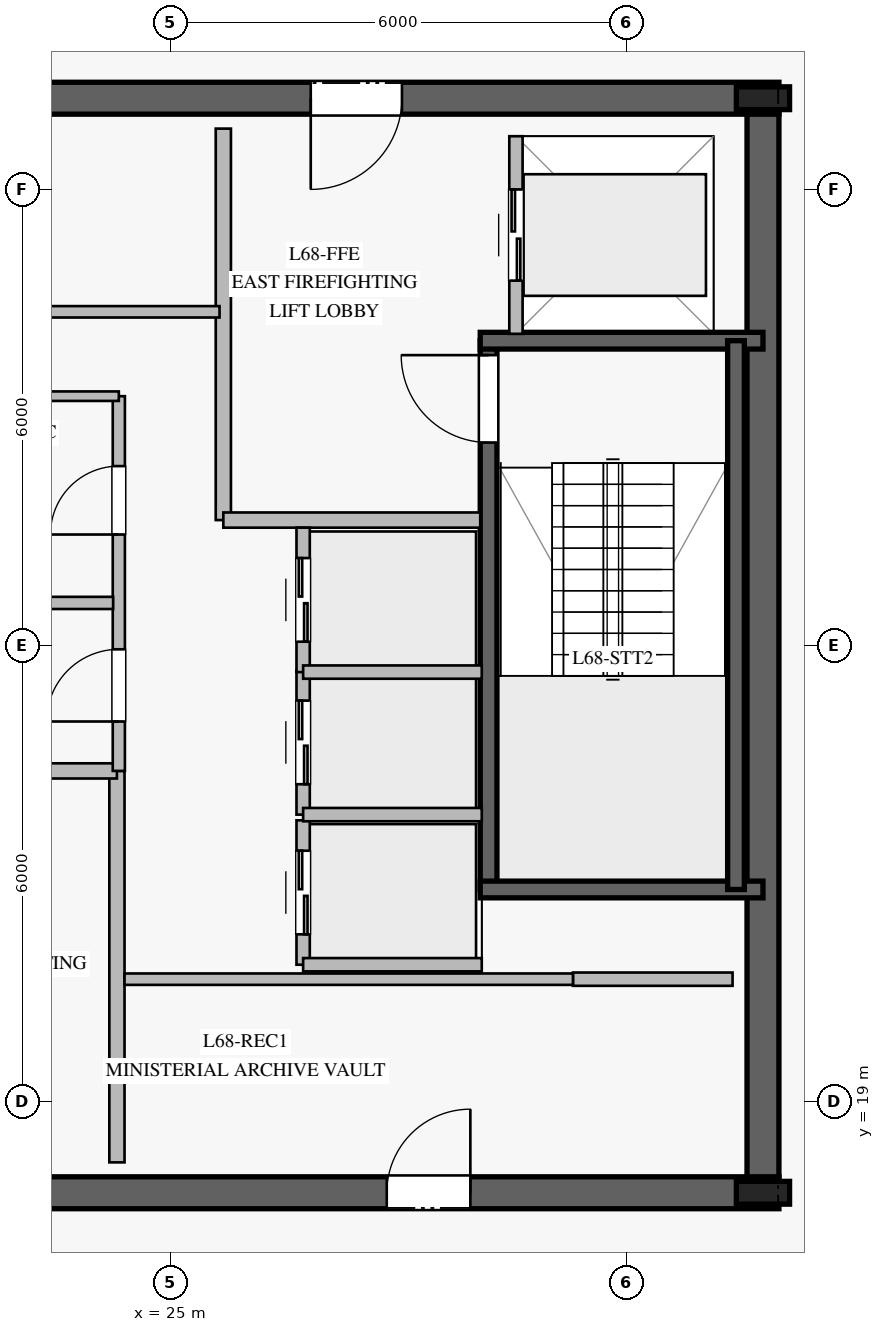
"""IFC4 building model, lengths in metres.
Left out: names, types, materials, properties, quantities, classifications, styles, units other than length and angle.
Written with IfcOpenShell. Run it as: python <this file> out.ifc"""

import sys

from ifc_helpers import new_model, si_unit, direction, frame, frame_2d, origin, origin_2d, place, context, subcontext, project, spatial, rectangle, i_section, extrude, element, fill, save


model = new_model("IFC4")
c1 = context("Model", 3, precision=1e-05, world=origin(), true_north=direction((0.0, 1.0)))
c2 = subcontext(c1, "Body", "Model", "MODEL_VIEW")
j1 = project(units=[si_unit("LENGTHUNIT", "METRE"), si_unit("PLANEANGLEUNIT", "RADIAN")], contexts=[c1])
p1 = place(None, origin())
s1 = spatial("IfcSite", under=j1, at=p1, CompositionType="ELEMENT")
p2 = place(p1, origin())
s2 = spatial("IfcBuilding", under=s1, at=p2, CompositionType="ELEMENT")
p3 = place(p2, frame((0.0, 0.0, 282.2)))
s3 = spatial("IfcBuildingStorey", under=s2, at=p3, CompositionType="ELEMENT", Elevation=282.2)
p4 = place(p3, frame((16.99, 17.8, 0.0), z_axis=(0.0, 0.0, 1.0), x_axis=(1.0, 0.0, 0.0)))
e1 = element("IfcWall", 1, at=p4, inside=s3, PredefinedType="SHEAR", context=c2, shape_type="SweptSolid", body=[
    extrude(rectangle(XDim=16.02, YDim=0.42, at=frame_2d((8.01, 0.0))), origin(), (0.0, 0.0, 1.0), 3.78),
])
p5 = place(p4, frame((4.96, 0.0, 0.0)))
e2 = element("IfcOpeningElement", 2, at=p5, cuts=e1, PredefinedType="OPENING", context=c2, shape_type="SweptSolid", body=[
    extrude(rectangle(XDim=1.2, YDim=2.25, at=frame_2d((0.6, 1.125))), frame((0.0, 0.22, 0.0), z_axis=(0.0, -1.0, 0.0), x_axis=(1.0, 0.0, 0.0)), (0.0, 0.0, 1.0), 0.44),
])
p6 = place(p4, frame((10.86, 0.0, 0.0)))
e3 = element("IfcOpeningElement", 3, at=p6, cuts=e1, PredefinedType="OPENING", context=c2, shape_type="SweptSolid", body=[
    extrude(rectangle(XDim=1.1, YDim=2.2, at=frame_2d((0.55, 1.1))), frame((0.0, 0.22, 0.0), z_axis=(0.0, -1.0, 0.0), x_axis=(1.0, 0.0, 0.0)), (0.0, 0.0, 1.0), 0.44),
])
p7 = place(p3, frame((33.01, 32.2, 0.0), z_axis=(0.0, 0.0, 1.0), x_axis=(-1.0, 0.0, 0.0)))
e4 = element("IfcWall", 4, at=p7, inside=s3, PredefinedType="SHEAR", context=c2, shape_type="SweptSolid", body=[
    extrude(rectangle(XDim=16.02, YDim=0.42, at=frame_2d((8.01, 0.0))), origin(), (0.0, 0.0, 1.0), 3.78),
])
p8 = place(p7, frame((4.96, 0.0, 0.0)))
e5 = element("IfcOpeningElement", 5, at=p8, cuts=e4, PredefinedType="OPENING", context=c2, shape_type="SweptSolid", body=[
    extrude(rectangle(XDim=1.2, YDim=2.25, at=frame_2d((0.6, 1.125))), frame((0.0, 0.22, 0.0), z_axis=(0.0, -1.0, 0.0), x_axis=(1.0, 0.0, 0.0)), (0.0, 0.0, 1.0), 0.44),
])
p9 = place(p7, frame((9.785, 0.0, 0.0)))
e6 = element("IfcOpeningElement", 6, at=p9, cuts=e4, PredefinedType="OPENING", context=c2, shape_type="SweptSolid", body=[
    extrude(rectangle(XDim=1.1, YDim=2.2, at=frame_2d((0.55, 1.1))), frame((0.0, 0.22, 0.0), z_axis=(0.0, -1.0, 0.0), x_axis=(1.0, 0.0, 0.0)), (0.0, 0.0, 1.0), 0.44),
])
p10 = place(p3, frame((32.8, 18.01, 0.0), z_axis=(0.0, 0.0, 1.0), x_axis=(0.0, 1.0, 0.0)))
e7 = element("IfcWall", 7, at=p10, inside=s3, PredefinedType="SHEAR", context=c2, shape_type="SweptSolid", body=[
    extrude(rectangle(XDim=13.98, YDim=0.42, at=frame_2d((6.99, 0.0))), origin(), (0.0, 0.0, 1.0), 3.78),
])
for number, where, z_axis, x_axis in (
    (8, (32.8, 17.8, 0.0), (0.0, 0.0, 1.0), (1.0, 0.0, 0.0)),
    (9, (32.8, 32.2, 0.0), (0.0, 0.0, 1.0), (1.0, 0.0, 0.0)),
):
    element("IfcColumn", number, at=place(p3, frame(where, z_axis=z_axis, x_axis=x_axis)), inside=s3, PredefinedType="COLUMN", context=c2, shape_type="SweptSolid", body=[
        extrude(i_section(OverallWidth=0.3, OverallDepth=0.7, WebThickness=0.017, FlangeThickness=0.032, at=origin_2d()), origin(), (0.0, 0.0, 1.0), 4.0),
    ])
p11 = place(p3, frame((29.19, 21.79, 0.0), z_axis=(0.0, 0.0, 1.0), x_axis=(0.0, 1.0, 0.0)))
e10 = element("IfcWall", 10, at=p11, inside=s3, PredefinedType="SOLIDWALL", context=c2, shape_type="SweptSolid", body=[
    extrude(rectangle(XDim=7.22, YDim=0.22, at=frame_2d((3.61, 0.0))), origin(), (0.0, 0.0, 1.0), 3.78),
])
p12 = place(p11, frame((5.88, 0.0, 0.0)))
e11 = element("IfcOpeningElement", 11, at=p12, cuts=e10, PredefinedType="OPENING", context=c2, shape_type="SweptSolid", body=[
    extrude(rectangle(XDim=1.15, YDim=2.2, at=frame_2d((0.575, 1.1))), frame((0.0, 0.12, 0.0), z_axis=(0.0, -1.0, 0.0), x_axis=(1.0, 0.0, 0.0)), (0.0, 0.0, 1.0), 0.24),
])
for number, where, z_axis, x_axis in (
    (12, (29.08, 21.79, 0.0), (0.0, 0.0, 1.0), (1.0, 0.0, 0.0)),
    (13, (29.08, 29.01, 0.0), (0.0, 0.0, 1.0), (1.0, 0.0, 0.0)),
):
    element("IfcWall", number, at=place(p3, frame(where, z_axis=z_axis, x_axis=x_axis)), inside=s3, PredefinedType="SOLIDWALL", context=c2, shape_type="SweptSolid", body=[
        extrude(rectangle(XDim=3.72, YDim=0.22, at=frame_2d((1.86, 0.0))), origin(), (0.0, 0.0, 1.0), 3.78),
    ])
p13 = place(p3, frame((32.445, 29.01, 0.0), z_axis=(0.0, 0.0, 1.0), x_axis=(0.0, -1.0, 0.0)))
e14 = element("IfcWall", 14, at=p13, inside=s3, PredefinedType="SOLIDWALL", context=c2, shape_type="SweptSolid", body=[
    extrude(rectangle(XDim=7.22, YDim=0.22, at=frame_2d((3.61, 0.0))), origin(), (0.0, 0.0, 1.0), 3.78),
])
p14 = place(p3, frame((24.3, 18.2, 0.0), z_axis=(0.0, 0.0, 1.0), x_axis=(0.0, 1.0, 0.0)))
e15 = element("IfcWall", 15, at=p14, inside=s3, PredefinedType="PARTITIONING", context=c2, shape_type="SweptSolid", body=[
    extrude(rectangle(XDim=5.15, YDim=0.2, at=frame_2d((2.575, 0.0))), origin(), (0.0, 0.0, 1.0), 3.78),
])
p15 = place(p3, frame((20.92, 23.35, 0.0), z_axis=(0.0, 0.0, 1.0), x_axis=(1.0, 0.0, 0.0)))
e16 = element("IfcWall", 16, at=p15, inside=s3, PredefinedType="PARTITIONING", context=c2, shape_type="SweptSolid", body=[
    extrude(rectangle(XDim=3.38, YDim=0.2, at=frame_2d((1.69, 0.0))), origin(), (0.0, 0.0, 1.0), 3.78),
])
p16 = place(p3, frame((25.7, 26.65, 0.0), z_axis=(0.0, 0.0, 1.0), x_axis=(0.0, 1.0, 0.0)))
e17 = element("IfcWall", 17, at=p16, inside=s3, PredefinedType="PARTITIONING", context=c2, shape_type="SweptSolid", body=[
    extrude(rectangle(XDim=5.15, YDim=0.2, at=frame_2d((2.575, 0.0))), origin(), (0.0, 0.0, 1.0), 3.78),
])
p17 = place(p3, frame((25.7, 26.65, 0.0), z_axis=(0.0, 0.0, 1.0), x_axis=(1.0, 0.0, 0.0)))
e18 = element("IfcWall", 18, at=p17, inside=s3, PredefinedType="PARTITIONING", context=c2, shape_type="SweptSolid", body=[
    extrude(rectangle(XDim=3.38, YDim=0.2, at=frame_2d((1.69, 0.0))), origin(), (0.0, 0.0, 1.0), 3.78),
])
p18 = place(p3, frame((24.325, 23.35, 0.0), z_axis=(0.0, 0.0, 1.0), x_axis=(0.0, 1.0, 0.0)))
e19 = element("IfcWall", 19, at=p18, inside=s3, PredefinedType="PLUMBINGWALL", context=c2, shape_type="SweptSolid", body=[
    extrude(rectangle(XDim=4.93, YDim=0.16, at=frame_2d((2.465, 0.0))), origin(), (0.0, 0.0, 1.0), 3.78),
])
p19 = place(p18, frame((0.65, 0.0, 0.0)))
e20 = element("IfcOpeningElement", 20, at=p19, cuts=e19, PredefinedType="OPENING", context=c2, shape_type="SweptSolid", body=[
    extrude(rectangle(XDim=0.95, YDim=2.1, at=frame_2d((0.475, 1.05))), frame((0.0, 0.09, 0.0), z_axis=(0.0, -1.0, 0.0), x_axis=(1.0, 0.0, 0.0)), (0.0, 0.0, 1.0), 0.18),
])
p20 = place(p18, frame((3.11, 0.0, 0.0)))
e21 = element("IfcOpeningElement", 21, at=p20, cuts=e19, PredefinedType="OPENING", context=c2, shape_type="SweptSolid", body=[
    extrude(rectangle(XDim=0.9, YDim=2.1, at=frame_2d((0.45, 1.05))), frame((0.0, 0.09, 0.0), z_axis=(0.0, -1.0, 0.0), x_axis=(1.0, 0.0, 0.0)), (0.0, 0.0, 1.0), 0.18),
])
p21 = place(p3, frame((20.92, 28.28, 0.0), z_axis=(0.0, 0.0, 1.0), x_axis=(1.0, 0.0, 0.0)))
e22 = element("IfcWall", 22, at=p21, inside=s3, PredefinedType="PARTITIONING", context=c2, shape_type="SweptSolid", body=[
    extrude(rectangle(XDim=3.405, YDim=0.125, at=frame_2d((1.703, 0.0))), origin(), (0.0, 0.0, 1.0), 3.78),
])
p22 = place(p21, frame((0.255, 0.0, 0.0)))
e23 = element("IfcOpeningElement", 23, at=p22, cuts=e22, PredefinedType="OPENING", context=c2, shape_type="SweptSolid", body=[
    extrude(rectangle(XDim=1.0, YDim=2.15, at=frame_2d((0.5, 1.075))), frame((0.0, 0.073, 0.0), z_axis=(0.0, -1.0, 0.0), x_axis=(1.0, 0.0, 0.0)), (0.0, 0.0, 1.0), 0.145),
])
p23 = place(p3, frame((20.95, 25.56, 0.0), z_axis=(0.0, 0.0, 1.0), x_axis=(1.0, 0.0, 0.0)))
e24 = element("IfcWall", 24, at=p23, inside=s3, PredefinedType="PLUMBINGWALL", context=c2, shape_type="SweptSolid", body=[
    extrude(rectangle(XDim=3.3, YDim=0.16, at=frame_2d((1.65, 0.0))), origin(), (0.0, 0.0, 1.0), 3.78),
])
p24 = place(p3, frame((30.3, 20.61, 0.0), z_axis=(0.0, 0.0, 1.0), x_axis=(1.0, 0.0, 0.0)))
e25 = element("IfcWall", 25, at=p24, inside=s3, PredefinedType="PARTITIONING", context=c2, shape_type="SweptSolid", body=[
    extrude(rectangle(XDim=2.1, YDim=0.175, at=frame_2d((1.05, 0.0))), origin(), (0.0, 0.0, 1.0), 3.78),
])
p25 = place(p3, frame((24.4, 20.61, 0.0), z_axis=(0.0, 0.0, 1.0), x_axis=(1.0, 0.0, 0.0)))
e26 = element("IfcWall", 26, at=p25, inside=s3, PredefinedType="PARTITIONING", context=c2, shape_type="SweptSolid", body=[
    extrude(rectangle(XDim=5.9, YDim=0.15, at=frame_2d((2.95, 0.0))), origin(), (0.0, 0.0, 1.0), 3.78),
])
p26 = place(p3, frame((19.75, 29.39, 0.0), z_axis=(0.0, 0.0, 1.0), x_axis=(1.0, 0.0, 0.0)))
e27 = element("IfcWall", 27, at=p26, inside=s3, PredefinedType="PARTITIONING", context=c2, shape_type="SweptSolid", body=[
    extrude(rectangle(XDim=5.9, YDim=0.15, at=frame_2d((2.95, 0.0))), origin(), (0.0, 0.0, 1.0), 3.78),
])
p27 = place(p3, frame((26.75, 20.8, 0.0), z_axis=(0.0, 0.0, 1.0), x_axis=(0.0, 1.0, 0.0)))
e28 = element("IfcWall", 28, at=p27, inside=s3, PredefinedType="PARTITIONING", context=c2, shape_type="SweptSolid", body=[
    extrude(rectangle(XDim=1.9, YDim=0.175, at=frame_2d((0.95, 0.0))), origin(), (0.0, 0.0, 1.0), 3.78),
])
p28 = place(p27, frame((0.4, 0.0, 0.0)))
e29 = element("IfcOpeningElement", 29, at=p28, cuts=e28, PredefinedType="OPENING", context=c2, shape_type="SweptSolid", body=[
    extrude(rectangle(XDim=1.1, YDim=2.2, at=frame_2d((0.55, 1.1))), frame((0.0, 0.098, 0.0), z_axis=(0.0, -1.0, 0.0), x_axis=(1.0, 0.0, 0.0)), (0.0, 0.0, 1.0), 0.195),
])
p29 = place(p3, frame((26.75, 20.8, 0.0), z_axis=(0.0, 0.0, 1.0), x_axis=(1.0, 0.0, 0.0)))
e30 = element("IfcWall", 30, at=p29, inside=s3, PredefinedType="PARTITIONING", context=c2, shape_type="SweptSolid", body=[
    extrude(rectangle(XDim=2.35, YDim=0.175, at=frame_2d((1.175, 0.0))), origin(), (0.0, 0.0, 1.0), 3.78),
])
p30 = place(p3, frame((26.75, 22.775, 0.0), z_axis=(0.0, 0.0, 1.0), x_axis=(0.0, 1.0, 0.0)))
e31 = element("IfcWall", 31, at=p30, inside=s3, PredefinedType="PARTITIONING", context=c2, shape_type="SweptSolid", body=[
    extrude(rectangle(XDim=1.9, YDim=0.175, at=frame_2d((0.95, 0.0))), origin(), (0.0, 0.0, 1.0), 3.78),
])
p31 = place(p30, frame((0.4, 0.0, 0.0)))
e32 = element("IfcOpeningElement", 32, at=p31, cuts=e31, PredefinedType="OPENING", context=c2, shape_type="SweptSolid", body=[
    extrude(rectangle(XDim=1.1, YDim=2.2, at=frame_2d((0.55, 1.1))), frame((0.0, 0.098, 0.0), z_axis=(0.0, -1.0, 0.0), x_axis=(1.0, 0.0, 0.0)), (0.0, 0.0, 1.0), 0.195),
])
p32 = place(p3, frame((26.75, 22.775, 0.0), z_axis=(0.0, 0.0, 1.0), x_axis=(1.0, 0.0, 0.0)))
e33 = element("IfcWall", 33, at=p32, inside=s3, PredefinedType="PARTITIONING", context=c2, shape_type="SweptSolid", body=[
    extrude(rectangle(XDim=2.35, YDim=0.175, at=frame_2d((1.175, 0.0))), origin(), (0.0, 0.0, 1.0), 3.78),
])
p33 = place(p3, frame((26.75, 24.65, 0.0), z_axis=(0.0, 0.0, 1.0), x_axis=(0.0, 1.0, 0.0)))
e34 = element("IfcWall", 34, at=p33, inside=s3, PredefinedType="PARTITIONING", context=c2, shape_type="SweptSolid", body=[
    extrude(rectangle(XDim=1.9, YDim=0.175, at=frame_2d((0.95, 0.0))), origin(), (0.0, 0.0, 1.0), 3.78),
])
p34 = place(p33, frame((0.4, 0.0, 0.0)))
e35 = element("IfcOpeningElement", 35, at=p34, cuts=e34, PredefinedType="OPENING", context=c2, shape_type="SweptSolid", body=[
    extrude(rectangle(XDim=1.1, YDim=2.2, at=frame_2d((0.55, 1.1))), frame((0.0, 0.098, 0.0), z_axis=(0.0, -1.0, 0.0), x_axis=(1.0, 0.0, 0.0)), (0.0, 0.0, 1.0), 0.195),
])
p35 = place(p3, frame((26.75, 24.65, 0.0), z_axis=(0.0, 0.0, 1.0), x_axis=(1.0, 0.0, 0.0)))
e36 = element("IfcWall", 36, at=p35, inside=s3, PredefinedType="PARTITIONING", context=c2, shape_type="SweptSolid", body=[
    extrude(rectangle(XDim=2.35, YDim=0.175, at=frame_2d((1.175, 0.0))), origin(), (0.0, 0.0, 1.0), 3.78),
])
p36 = place(p3, frame((29.55, 29.1, 0.0), z_axis=(0.0, 0.0, 1.0), x_axis=(0.0, 1.0, 0.0)))
e37 = element("IfcWall", 37, at=p36, inside=s3, PredefinedType="PARTITIONING", context=c2, shape_type="SweptSolid", body=[
    extrude(rectangle(XDim=2.6, YDim=0.175, at=frame_2d((1.3, 0.0))), origin(), (0.0, 0.0, 1.0), 3.78),
])
p37 = place(p36, frame((0.7, 0.0, 0.0)))
e38 = element("IfcOpeningElement", 38, at=p37, cuts=e37, PredefinedType="OPENING", context=c2, shape_type="SweptSolid", body=[
    extrude(rectangle(XDim=1.2, YDim=2.2, at=frame_2d((0.6, 1.1))), frame((0.0, 0.098, 0.0), z_axis=(0.0, -1.0, 0.0), x_axis=(1.0, 0.0, 0.0)), (0.0, 0.0, 1.0), 0.195),
])
p38 = place(p12, origin())
e39 = element("IfcDoor", 39, at=p38, inside=s3, OperationType="SINGLE_SWING_RIGHT", PredefinedType="DOOR", context=c2, shape_type="SweptSolid", body=[
    extrude(rectangle(XDim=1.15, YDim=2.2, at=frame_2d((0.575, 1.1))), frame((0.0, 0.025, 0.0), z_axis=(0.0, -1.0, 0.0), x_axis=(1.0, 0.0, 0.0)), (0.0, 0.0, 1.0), 0.05),
])
fill(e11, e39)
p39 = place(p8, origin())
e40 = element("IfcDoor", 40, at=p39, inside=s3, OperationType="SINGLE_SWING_RIGHT", PredefinedType="DOOR", context=c2, shape_type="SweptSolid", body=[
    extrude(rectangle(XDim=1.2, YDim=2.25, at=frame_2d((0.6, 1.125))), frame((0.0, 0.025, 0.0), z_axis=(0.0, -1.0, 0.0), x_axis=(1.0, 0.0, 0.0)), (0.0, 0.0, 1.0), 0.05),
])
fill(e5, e40)
p40 = place(p19, origin())
e41 = element("IfcDoor", 41, at=p40, inside=s3, OperationType="SINGLE_SWING_LEFT", PredefinedType="DOOR", context=c2, shape_type="SweptSolid", body=[
    extrude(rectangle(XDim=0.95, YDim=2.1, at=frame_2d((0.475, 1.05))), frame((0.0, 0.025, 0.0), z_axis=(0.0, -1.0, 0.0), x_axis=(1.0, 0.0, 0.0)), (0.0, 0.0, 1.0), 0.05),
])
fill(e20, e41)
p41 = place(p20, origin())
e42 = element("IfcDoor", 42, at=p41, inside=s3, OperationType="SINGLE_SWING_LEFT", PredefinedType="DOOR", context=c2, shape_type="SweptSolid", body=[
    extrude(rectangle(XDim=0.9, YDim=2.1, at=frame_2d((0.45, 1.05))), frame((0.0, 0.025, 0.0), z_axis=(0.0, -1.0, 0.0), x_axis=(1.0, 0.0, 0.0)), (0.0, 0.0, 1.0), 0.05),
])
fill(e21, e42)
p42 = place(p6, origin())
e43 = element("IfcDoor", 43, at=p42, inside=s3, OperationType="SINGLE_SWING_RIGHT", PredefinedType="DOOR", context=c2, shape_type="SweptSolid", body=[
    extrude(rectangle(XDim=1.1, YDim=2.2, at=frame_2d((0.55, 1.1))), frame((0.0, 0.025, 0.0), z_axis=(0.0, -1.0, 0.0), x_axis=(1.0, 0.0, 0.0)), (0.0, 0.0, 1.0), 0.05),
])
fill(e3, e43)
p43 = place(p28, origin())
e44 = element("IfcDoor", 44, at=p43, inside=s3, OperationType="DOUBLE_DOOR_SLIDING", PredefinedType="DOOR", context=c2, shape_type="SweptSolid", body=[
    extrude(rectangle(XDim=1.1, YDim=2.2, at=frame_2d((0.55, 1.1))), frame((0.0, 0.025, 0.0), z_axis=(0.0, -1.0, 0.0), x_axis=(1.0, 0.0, 0.0)), (0.0, 0.0, 1.0), 0.05),
])
fill(e29, e44)
p44 = place(p31, origin())
e45 = element("IfcDoor", 45, at=p44, inside=s3, OperationType="DOUBLE_DOOR_SLIDING", PredefinedType="DOOR", context=c2, shape_type="SweptSolid", body=[
    extrude(rectangle(XDim=1.1, YDim=2.2, at=frame_2d((0.55, 1.1))), frame((0.0, 0.025, 0.0), z_axis=(0.0, -1.0, 0.0), x_axis=(1.0, 0.0, 0.0)), (0.0, 0.0, 1.0), 0.05),
])
fill(e32, e45)
p45 = place(p34, origin())
e46 = element("IfcDoor", 46, at=p45, inside=s3, OperationType="DOUBLE_DOOR_SLIDING", PredefinedType="DOOR", context=c2, shape_type="SweptSolid", body=[
    extrude(rectangle(XDim=1.1, YDim=2.2, at=frame_2d((0.55, 1.1))), frame((0.0, 0.025, 0.0), z_axis=(0.0, -1.0, 0.0), x_axis=(1.0, 0.0, 0.0)), (0.0, 0.0, 1.0), 0.05),
])
fill(e35, e46)
p46 = place(p37, origin())
e47 = element("IfcDoor", 47, at=p46, inside=s3, OperationType="DOUBLE_DOOR_SLIDING", PredefinedType="DOOR", context=c2, shape_type="SweptSolid", body=[
    extrude(rectangle(XDim=1.2, YDim=2.2, at=frame_2d((0.6, 1.1))), frame((0.0, 0.025, 0.0), z_axis=(0.0, -1.0, 0.0), x_axis=(1.0, 0.0, 0.0)), (0.0, 0.0, 1.0), 0.05),
])
fill(e38, e47)
save(model, sys.argv[1])
